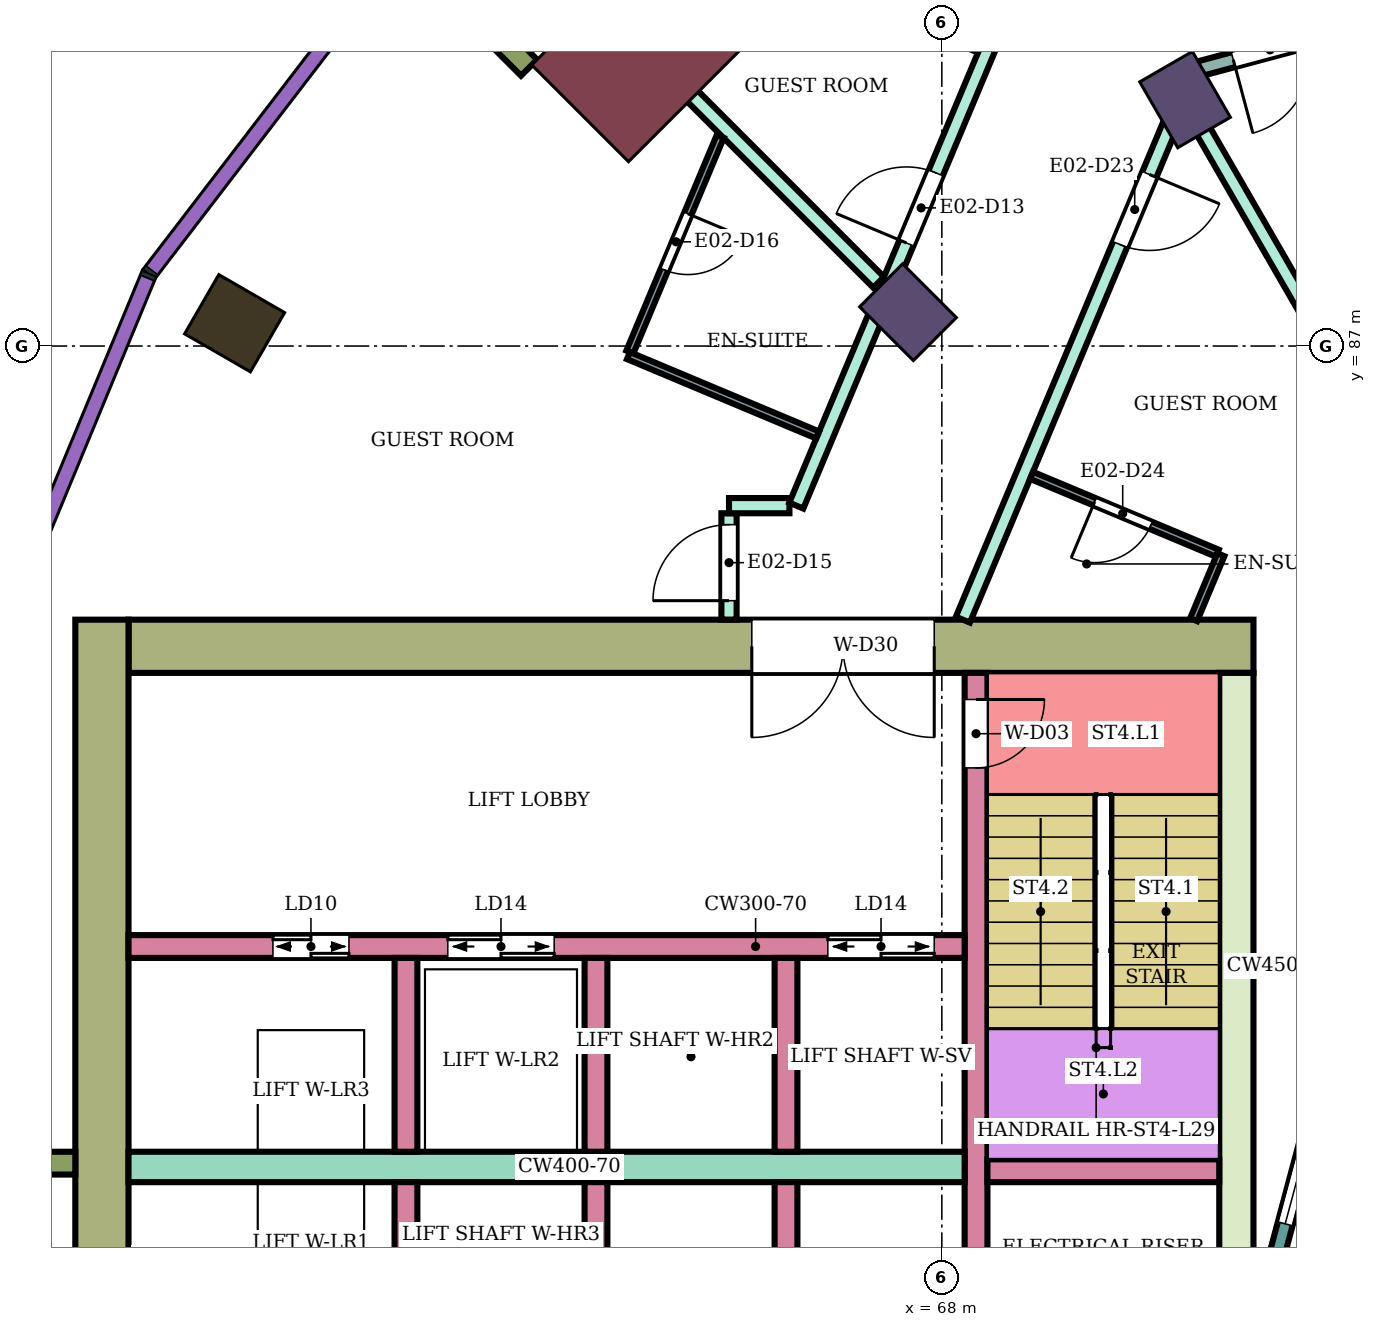
"""IFC4 building model, lengths in metres.
Left out: names, types, materials, properties, quantities, classifications, styles, units other than length and angle.
Written with IfcOpenShell. Run it as: python <this file> out.ifc"""

import sys

from ifc_helpers import new_model, si_unit, direction, frame, frame_2d, origin, origin_2d, place, context, subcontext, project, spatial, rectangle, extrude, element, fill, save


model = new_model("IFC4")
c1 = context("Model", 3, precision=1e-05, world=origin(), true_north=direction((0.0, 1.0)))
c2 = subcontext(c1, "Body", "Model", "MODEL_VIEW")
j1 = project(units=[si_unit("LENGTHUNIT", "METRE"), si_unit("PLANEANGLEUNIT", "RADIAN")], contexts=[c1])
p1 = place(None, origin())
s1 = spatial("IfcSite", under=j1, at=p1, CompositionType="ELEMENT")
p2 = place(p1, origin())
s2 = spatial("IfcBuilding", under=s1, at=p2, CompositionType="ELEMENT")
p3 = place(p2, frame((0.0, 0.0, 126.3)))
s3 = spatial("IfcBuildingStorey", under=s2, at=p3, CompositionType="ELEMENT", Elevation=126.3)
p4 = place(p3, frame((58.696, 87.3, 0.0), z_axis=(0.0, 0.0, 1.0), x_axis=(-0.866025403784, 0.5, 0.0)))
e1 = element("IfcColumn", 1, at=p4, inside=s3, PredefinedType="COLUMN", context=c2, shape_type="SweptSolid", body=[
    extrude(rectangle(XDim=1.0, YDim=0.9, at=origin_2d()), origin(), (0.0, 0.0, 1.0), 3.9),
])
for number, where, z_axis, x_axis in (
    (2, (71.2, 90.242, 0.0), (0.0, 0.0, 1.0), (-0.5, 0.866, 0.0)),
    (3, (67.555, 87.445, 0.0), (0.0, 0.0, 1.0), (-0.707, 0.707, 0.0)),
):
    element("IfcColumn", number, at=place(p3, frame(where, z_axis=z_axis, x_axis=x_axis)), inside=s3, PredefinedType="COLUMN", context=c2, shape_type="SweptSolid", body=[
        extrude(rectangle(XDim=1.0, YDim=0.8, at=origin_2d()), origin(), (0.0, 0.0, 1.0), 3.9),
    ])
p5 = place(p3, frame((64.09, 90.91, 0.0), z_axis=(0.0, 0.0, 1.0), x_axis=(-0.707106781187, 0.707106781187, 0.0)))
e4 = element("IfcColumn", 4, at=p5, inside=s3, PredefinedType="COLUMN", context=c2, shape_type="SweptSolid", body=[
    extrude(rectangle(XDim=1.8, YDim=2.4, at=origin_2d()), origin(), (0.0, 0.0, 1.0), 3.9),
])
p6 = place(p3, frame((72.1, 83.05, 0.0), z_axis=(0.0, 0.0, 1.0), x_axis=(-1.0, 0.0, 0.0)))
e5 = element("IfcWall", 5, at=p6, inside=s3, PredefinedType="SHEAR", context=c2, shape_type="SweptSolid", body=[
    extrude(rectangle(XDim=14.8, YDim=0.7, at=frame_2d((7.4, 0.0))), origin(), (0.0, 0.0, 1.0), 3.58),
])
p7 = place(p6, frame((4.2, 0.0, 0.0)))
e6 = element("IfcOpeningElement", 6, at=p7, cuts=e5, PredefinedType="OPENING", context=c2, shape_type="SweptSolid", body=[
    extrude(rectangle(XDim=2.4, YDim=2.4, at=frame_2d((1.2, 1.2))), frame((0.0, 0.36, 0.0), z_axis=(0.0, -1.0, 0.0), x_axis=(1.0, 0.0, 0.0)), (0.0, 0.0, 1.0), 0.72),
])
p8 = place(p3, frame((71.875, 82.7, 0.0), z_axis=(0.0, 0.0, 1.0), x_axis=(0.0, -1.0, 0.0)))
e7 = element("IfcWall", 7, at=p8, inside=s3, PredefinedType="SHEAR", context=c2, shape_type="SweptSolid", body=[
    extrude(rectangle(XDim=7.7, YDim=0.45, at=frame_2d((3.85, 0.0))), origin(), (0.0, 0.0, 1.0), 3.58),
])
p9 = place(p3, frame((56.95, 83.4, 0.0), z_axis=(0.0, 0.0, 1.0), x_axis=(0.0, -1.0, 0.0)))
e8 = element("IfcWall", 8, at=p9, inside=s3, PredefinedType="SHEAR", context=c2, shape_type="SweptSolid", body=[
    extrude(rectangle(XDim=16.8, YDim=0.7, at=frame_2d((8.4, 0.0))), origin(), (0.0, 0.0, 1.0), 3.58),
])
p10 = place(p3, frame((68.45, 82.7, 0.0), z_axis=(0.0, 0.0, 1.0), x_axis=(0.0, -1.0, 0.0)))
e9 = element("IfcWall", 9, at=p10, inside=s3, PredefinedType="SHEAR", context=c2, shape_type="SweptSolid", body=[
    extrude(rectangle(XDim=7.7, YDim=0.3, at=frame_2d((3.85, 0.0))), origin(), (0.0, 0.0, 1.0), 3.58),
])
p11 = place(p10, frame((0.35, 0.0, 0.0)))
e10 = element("IfcOpeningElement", 10, at=p11, cuts=e9, PredefinedType="OPENING", context=c2, shape_type="SweptSolid", body=[
    extrude(rectangle(XDim=0.9, YDim=2.1, at=frame_2d((0.45, 1.05))), frame((0.0, 0.16, 0.0), z_axis=(0.0, -1.0, 0.0), x_axis=(1.0, 0.0, 0.0)), (0.0, 0.0, 1.0), 0.32),
])
p12 = place(p3, frame((71.65, 76.15, 0.0), z_axis=(0.0, 0.0, 1.0), x_axis=(-1.0, 0.0, 0.0)))
e11 = element("IfcWall", 11, at=p12, inside=s3, PredefinedType="SHEAR", context=c2, shape_type="SweptSolid", body=[
    extrude(rectangle(XDim=3.05, YDim=0.3, at=frame_2d((1.525, 0.0))), origin(), (0.0, 0.0, 1.0), 3.58),
])
p13 = place(p3, frame((68.3, 76.2, 0.0), z_axis=(0.0, 0.0, 1.0), x_axis=(-1.0, 0.0, 0.0)))
e12 = element("IfcWall", 12, at=p13, inside=s3, PredefinedType="SHEAR", context=c2, shape_type="SweptSolid", body=[
    extrude(rectangle(XDim=11.0, YDim=0.4, at=frame_2d((5.5, 0.0))), origin(), (0.0, 0.0, 1.0), 3.58),
])
p14 = place(p3, frame((68.3, 79.1, 0.0), z_axis=(0.0, 0.0, 1.0), x_axis=(-1.0, 0.0, 0.0)))
e13 = element("IfcWall", 13, at=p14, inside=s3, PredefinedType="SHEAR", context=c2, shape_type="SweptSolid", body=[
    extrude(rectangle(XDim=11.0, YDim=0.3, at=frame_2d((5.5, 0.0))), origin(), (0.0, 0.0, 1.0), 3.58),
])
p15 = place(p14, frame((0.4, 0.0, 0.0)))
e14 = element("IfcOpeningElement", 14, at=p15, cuts=e13, PredefinedType="OPENING", context=c2, shape_type="SweptSolid", body=[
    extrude(rectangle(XDim=1.4, YDim=2.1, at=frame_2d((0.7, 1.05))), frame((0.0, 0.16, 0.0), z_axis=(0.0, -1.0, 0.0), x_axis=(1.0, 0.0, 0.0)), (0.0, 0.0, 1.0), 0.32),
])
p16 = place(p14, frame((5.4, 0.0, 0.0)))
e15 = element("IfcOpeningElement", 15, at=p16, cuts=e13, PredefinedType="OPENING", context=c2, shape_type="SweptSolid", body=[
    extrude(rectangle(XDim=1.4, YDim=2.1, at=frame_2d((0.7, 1.05))), frame((0.0, 0.16, 0.0), z_axis=(0.0, -1.0, 0.0), x_axis=(1.0, 0.0, 0.0)), (0.0, 0.0, 1.0), 0.32),
])
p17 = place(p14, frame((8.1, 0.0, 0.0)))
e16 = element("IfcOpeningElement", 16, at=p17, cuts=e13, PredefinedType="OPENING", context=c2, shape_type="SweptSolid", body=[
    extrude(rectangle(XDim=1.0, YDim=2.1, at=frame_2d((0.5, 1.05))), frame((0.0, 0.16, 0.0), z_axis=(0.0, -1.0, 0.0), x_axis=(1.0, 0.0, 0.0)), (0.0, 0.0, 1.0), 0.32),
])
for number, where, z_axis, x_axis in (
    (17, (65.95, 76.0, 0.0), (0.0, 0.0, 1.0), (0.0, -1.0, 0.0)),
    (18, (63.45, 76.0, 0.0), (0.0, 0.0, 1.0), (0.0, -1.0, 0.0)),
    (19, (60.95, 76.0, 0.0), (0.0, 0.0, 1.0), (0.0, -1.0, 0.0)),
    (20, (65.95, 78.95, 0.0), (0.0, 0.0, 1.0), (0.0, -1.0, 0.0)),
    (21, (63.45, 78.95, 0.0), (0.0, 0.0, 1.0), (0.0, -1.0, 0.0)),
    (22, (60.95, 78.95, 0.0), (0.0, 0.0, 1.0), (0.0, -1.0, 0.0)),
):
    element("IfcWall", number, at=place(p3, frame(where, z_axis=z_axis, x_axis=x_axis)), inside=s3, PredefinedType="SHEAR", context=c2, shape_type="SweptSolid", body=[
        extrude(rectangle(XDim=2.55, YDim=0.3, at=frame_2d((1.275, 0.0))), origin(), (0.0, 0.0, 1.0), 3.58),
    ])
for number, where, z_axis, x_axis in (
    (23, (62.57, 90.662, 0.0), (0.0, 0.0, 1.0), (-0.707, 0.707, 0.0)),
    (24, (56.6, 76.25, 0.0), (0.0, 0.0, 1.0), (-1.0, 0.0, 0.0)),
):
    element("IfcWall", number, at=place(p3, frame(where, z_axis=z_axis, x_axis=x_axis)), inside=s3, PredefinedType="NOTDEFINED", context=c2, shape_type="SweptSolid", body=[
        extrude(rectangle(XDim=2.416, YDim=0.3, at=frame_2d((1.208, 0.0))), origin(), (0.0, 0.0, 1.0), 3.9),
    ])
p18 = place(p3, frame((73.415, 78.802, 0.0), z_axis=(0.0, 0.0, 1.0), x_axis=(-0.258789828301, -0.965933654434, 0.0)))
e25 = element("IfcWall", 25, at=p18, inside=s3, PredefinedType="NOTDEFINED", context=c2, shape_type="SweptSolid", body=[
    extrude(rectangle(XDim=3.936, YDim=0.2, at=frame_2d((1.968, 0.0))), origin(), (0.0, 0.0, 1.0), 3.9),
])
p19 = place(p18, frame((0.468, 0.0, 0.9)))
e26 = element("IfcOpeningElement", 26, at=p19, cuts=e25, PredefinedType="OPENING", context=c2, shape_type="SweptSolid", body=[
    extrude(rectangle(XDim=3.0, YDim=2.3, at=frame_2d((1.5, 1.15))), frame((0.0, 0.11, 0.0), z_axis=(0.0, -1.0, 0.0), x_axis=(1.0, 0.0, 0.0)), (0.0, 0.0, 1.0), 0.22),
])
p20 = place(p3, frame((63.6, 91.409, 0.0), z_axis=(0.0, 0.0, 1.0), x_axis=(0.706937509868, -0.707276011993, 0.0)))
e27 = element("IfcWall", 27, at=p20, inside=s3, PredefinedType="PARTITIONING", context=c2, shape_type="SweptSolid", body=[
    extrude(rectangle(XDim=5.049, YDim=0.2, at=frame_2d((2.524, 0.0))), origin(), (0.0, 0.0, 1.0), 3.45),
])
p21 = place(p3, frame((65.2, 83.401, 0.0), z_axis=(0.0, 0.0, 1.0), x_axis=(0.0, 1.0, 0.0)))
e28 = element("IfcWall", 28, at=p21, inside=s3, PredefinedType="PARTITIONING", context=c2, shape_type="SweptSolid", body=[
    extrude(rectangle(XDim=1.399, YDim=0.2, at=frame_2d((0.7, 0.0))), origin(), (0.0, 0.0, 1.0), 3.45),
])
p22 = place(p21, frame((0.249, 0.0, 0.0)))
e29 = element("IfcOpeningElement", 29, at=p22, cuts=e28, PredefinedType="OPENING", context=c2, shape_type="SweptSolid", body=[
    extrude(rectangle(XDim=1.0, YDim=2.1, at=frame_2d((0.5, 1.05))), frame((0.0, 0.11, 0.0), z_axis=(0.0, -1.0, 0.0), x_axis=(1.0, 0.0, 0.0)), (0.0, 0.0, 1.0), 0.22),
])
p23 = place(p3, frame((65.2, 84.9, 0.0), z_axis=(0.0, 0.0, 1.0), x_axis=(1.0, 0.0, 0.0)))
e30 = element("IfcWall", 30, at=p23, inside=s3, PredefinedType="PARTITIONING", context=c2, shape_type="SweptSolid", body=[
    extrude(rectangle(XDim=0.795, YDim=0.2, at=frame_2d((0.397, 0.0))), origin(), (0.0, 0.0, 1.0), 3.45),
])
p24 = place(p3, frame((66.085, 84.9, 0.0), z_axis=(0.0, 0.0, 1.0), x_axis=(0.386617151403, 0.922240303956, 0.0)))
e31 = element("IfcWall", 31, at=p24, inside=s3, PredefinedType="PARTITIONING", context=c2, shape_type="SweptSolid", body=[
    extrude(rectangle(XDim=8.5, YDim=0.2, at=frame_2d((4.25, 0.0))), origin(), (0.0, 0.0, 1.0), 3.45),
])
p25 = place(p24, frame((3.748, 0.0, 0.0)))
e32 = element("IfcOpeningElement", 32, at=p25, cuts=e31, PredefinedType="OPENING", context=c2, shape_type="SweptSolid", body=[
    extrude(rectangle(XDim=1.0, YDim=2.1, at=frame_2d((0.5, 1.05))), frame((0.0, 0.11, 0.0), z_axis=(0.0, -1.0, 0.0), x_axis=(1.0, 0.0, 0.0)), (0.0, 0.0, 1.0), 0.22),
])
p26 = place(p3, frame((68.277, 83.4, 0.0), z_axis=(0.0, 0.0, 1.0), x_axis=(0.386454861164, 0.922308321703, 0.0)))
e33 = element("IfcWall", 33, at=p26, inside=s3, PredefinedType="PARTITIONING", context=c2, shape_type="SweptSolid", body=[
    extrude(rectangle(XDim=7.762, YDim=0.2, at=frame_2d((3.881, 0.0))), origin(), (0.0, 0.0, 1.0), 3.45),
])
p27 = place(p26, frame((5.351, 0.0, 0.0)))
e34 = element("IfcOpeningElement", 34, at=p27, cuts=e33, PredefinedType="OPENING", context=c2, shape_type="SweptSolid", body=[
    extrude(rectangle(XDim=1.0, YDim=2.1, at=frame_2d((0.5, 1.05))), frame((0.0, 0.11, 0.0), z_axis=(0.0, -1.0, 0.0), x_axis=(1.0, 0.0, 0.0)), (0.0, 0.0, 1.0), 0.22),
])
p28 = place(p3, frame((71.263, 90.135, 0.0), z_axis=(0.0, 0.0, 1.0), x_axis=(0.499869438034, -0.86610077065, 0.0)))
e35 = element("IfcWall", 35, at=p28, inside=s3, PredefinedType="PARTITIONING", context=c2, shape_type="SweptSolid", body=[
    extrude(rectangle(XDim=9.777, YDim=0.2, at=frame_2d((4.889, 0.0))), origin(), (0.0, 0.0, 1.0), 3.45),
])
p29 = place(p3, frame((71.303, 90.625, 0.0), z_axis=(0.0, 0.0, 1.0), x_axis=(0.965971868307, 0.258647152776, 0.0)))
e36 = element("IfcWall", 36, at=p29, inside=s3, PredefinedType="PARTITIONING", context=c2, shape_type="SweptSolid", body=[
    extrude(rectangle(XDim=8.874, YDim=0.2, at=frame_2d((4.437, 0.0))), origin(), (0.0, 0.0, 1.0), 3.08),
])
p30 = place(p29, frame((0.55, 0.0, 0.0)))
e37 = element("IfcOpeningElement", 37, at=p30, cuts=e36, PredefinedType="OPENING", context=c2, shape_type="SweptSolid", body=[
    extrude(rectangle(XDim=1.0, YDim=2.1, at=frame_2d((0.5, 1.05))), frame((0.0, 0.11, 0.0), z_axis=(0.0, -1.0, 0.0), x_axis=(1.0, 0.0, 0.0)), (0.0, 0.0, 1.0), 0.22),
])
p31 = place(p3, frame((63.896, 86.92, 0.0), z_axis=(0.0, 0.0, 1.0), x_axis=(0.386637413037, 0.922231809709, 0.0)))
e38 = element("IfcWall", 38, at=p31, inside=s3, PredefinedType="PARTITIONING", context=c2, shape_type="SweptSolid", body=[
    extrude(rectangle(XDim=3.076, YDim=0.1, at=frame_2d((1.538, 0.0))), origin(), (0.0, 0.0, 1.0), 3.45),
])
p32 = place(p31, frame((1.173, 0.0, 0.0)))
e39 = element("IfcOpeningElement", 39, at=p32, cuts=e38, PredefinedType="OPENING", context=c2, shape_type="SweptSolid", body=[
    extrude(rectangle(XDim=0.8, YDim=2.1, at=frame_2d((0.4, 1.05))), frame((0.0, 0.06, 0.0), z_axis=(0.0, -1.0, 0.0), x_axis=(1.0, 0.0, 0.0)), (0.0, 0.0, 1.0), 0.12),
])
p33 = place(p3, frame((63.877, 86.874, 0.0), z_axis=(0.0, 0.0, 1.0), x_axis=(0.92214860299, -0.386835823062, 0.0)))
e40 = element("IfcWall", 40, at=p33, inside=s3, PredefinedType="PARTITIONING", context=c2, shape_type="SweptSolid", body=[
    extrude(rectangle(XDim=2.7, YDim=0.1, at=frame_2d((1.35, 0.0))), origin(), (0.0, 0.0, 1.0), 3.45),
])
p34 = place(p3, frame((66.049, 91.931, 0.0), z_axis=(0.0, 0.0, 1.0), x_axis=(0.922344808264, -0.38636777126, 0.0)))
e41 = element("IfcWall", 41, at=p34, inside=s3, PredefinedType="PARTITIONING", context=c2, shape_type="SweptSolid", body=[
    extrude(rectangle(XDim=2.65, YDim=0.1, at=frame_2d((1.325, 0.0))), origin(), (0.0, 0.0, 1.0), 3.45),
])
p35 = place(p3, frame((69.181, 85.298, 0.0), z_axis=(0.0, 0.0, 1.0), x_axis=(0.922377635784, -0.38628939541, 0.0)))
e42 = element("IfcWall", 42, at=p35, inside=s3, PredefinedType="PARTITIONING", context=c2, shape_type="SweptSolid", body=[
    extrude(rectangle(XDim=2.65, YDim=0.1, at=frame_2d((1.325, 0.0))), origin(), (0.0, 0.0, 1.0), 3.45),
])
p36 = place(p35, frame((0.9, 0.0, 0.0)))
e43 = element("IfcOpeningElement", 43, at=p36, cuts=e42, PredefinedType="OPENING", context=c2, shape_type="SweptSolid", body=[
    extrude(rectangle(XDim=0.8, YDim=2.1, at=frame_2d((0.4, 1.05))), frame((0.0, 0.06, 0.0), z_axis=(0.0, -1.0, 0.0), x_axis=(1.0, 0.0, 0.0)), (0.0, 0.0, 1.0), 0.12),
])
p37 = place(p3, frame((71.313, 83.4, 0.0), z_axis=(0.0, 0.0, 1.0), x_axis=(0.386148512695, 0.922436624459, 0.0)))
e44 = element("IfcWall", 44, at=p37, inside=s3, PredefinedType="PARTITIONING", context=c2, shape_type="SweptSolid", body=[
    extrude(rectangle(XDim=0.927, YDim=0.1, at=frame_2d((0.463, 0.0))), origin(), (0.0, 0.0, 1.0), 3.45),
])
p38 = place(p19, origin())
e45 = element("IfcWindow", 45, at=p38, inside=s3, PartitioningType="SINGLE_PANEL", PredefinedType="WINDOW", context=c2, shape_type="SweptSolid", body=[
    extrude(rectangle(XDim=3.0, YDim=2.3, at=frame_2d((1.5, 1.15))), frame((0.0, 0.03, 0.0), z_axis=(0.0, -1.0, 0.0), x_axis=(1.0, 0.0, 0.0)), (0.0, 0.0, 1.0), 0.06),
])
fill(e26, e45)
p39 = place(p25, origin())
e46 = element("IfcDoor", 46, at=p39, inside=s3, OperationType="SINGLE_SWING_LEFT", PredefinedType="DOOR", context=c2, shape_type="SweptSolid", body=[
    extrude(rectangle(XDim=1.0, YDim=2.1, at=frame_2d((0.5, 1.05))), frame((0.0, 0.025, 0.0), z_axis=(0.0, -1.0, 0.0), x_axis=(1.0, 0.0, 0.0)), (0.0, 0.0, 1.0), 0.05),
])
fill(e32, e46)
p40 = place(p22, origin())
e47 = element("IfcDoor", 47, at=p40, inside=s3, OperationType="SINGLE_SWING_LEFT", PredefinedType="DOOR", context=c2, shape_type="SweptSolid", body=[
    extrude(rectangle(XDim=1.0, YDim=2.1, at=frame_2d((0.5, 1.05))), frame((0.0, 0.025, 0.0), z_axis=(0.0, -1.0, 0.0), x_axis=(1.0, 0.0, 0.0)), (0.0, 0.0, 1.0), 0.05),
])
fill(e29, e47)
p41 = place(p32, frame((0.8, 0.0, 0.0), z_axis=(0.0, 0.0, 1.0), x_axis=(-1.0, 0.0, 0.0)))
e48 = element("IfcDoor", 48, at=p41, inside=s3, OperationType="SINGLE_SWING_LEFT", PredefinedType="DOOR", context=c2, shape_type="SweptSolid", body=[
    extrude(rectangle(XDim=0.8, YDim=2.1, at=frame_2d((0.4, 1.05))), frame((0.0, 0.025, 0.0), z_axis=(0.0, -1.0, 0.0), x_axis=(1.0, 0.0, 0.0)), (0.0, 0.0, 1.0), 0.05),
])
fill(e39, e48)
p42 = place(p30, frame((1.0, 0.0, 0.0), z_axis=(0.0, 0.0, 1.0), x_axis=(-1.0, 0.0, 0.0)))
e49 = element("IfcDoor", 49, at=p42, inside=s3, OperationType="SINGLE_SWING_RIGHT", PredefinedType="DOOR", context=c2, shape_type="SweptSolid", body=[
    extrude(rectangle(XDim=1.0, YDim=2.1, at=frame_2d((0.5, 1.05))), frame((0.0, 0.025, 0.0), z_axis=(0.0, -1.0, 0.0), x_axis=(1.0, 0.0, 0.0)), (0.0, 0.0, 1.0), 0.05),
])
fill(e37, e49)
p43 = place(p27, frame((1.0, 0.0, 0.0), z_axis=(0.0, 0.0, 1.0), x_axis=(-1.0, 0.0, 0.0)))
e50 = element("IfcDoor", 50, at=p43, inside=s3, OperationType="SINGLE_SWING_LEFT", PredefinedType="DOOR", context=c2, shape_type="SweptSolid", body=[
    extrude(rectangle(XDim=1.0, YDim=2.1, at=frame_2d((0.5, 1.05))), frame((0.0, 0.025, 0.0), z_axis=(0.0, -1.0, 0.0), x_axis=(1.0, 0.0, 0.0)), (0.0, 0.0, 1.0), 0.05),
])
fill(e34, e50)
p44 = place(p36, frame((0.8, 0.0, 0.0), z_axis=(0.0, 0.0, 1.0), x_axis=(-1.0, 0.0, 0.0)))
e51 = element("IfcDoor", 51, at=p44, inside=s3, OperationType="SINGLE_SWING_RIGHT", PredefinedType="DOOR", context=c2, shape_type="SweptSolid", body=[
    extrude(rectangle(XDim=0.8, YDim=2.1, at=frame_2d((0.4, 1.05))), frame((0.0, 0.025, 0.0), z_axis=(0.0, -1.0, 0.0), x_axis=(1.0, 0.0, 0.0)), (0.0, 0.0, 1.0), 0.05),
])
fill(e43, e51)
p45 = place(p11, origin())
e52 = element("IfcDoor", 52, at=p45, inside=s3, OperationType="SINGLE_SWING_LEFT", PredefinedType="DOOR", context=c2, shape_type="SweptSolid", body=[
    extrude(rectangle(XDim=0.9, YDim=2.1, at=frame_2d((0.45, 1.05))), frame((0.0, 0.025, 0.0), z_axis=(0.0, -1.0, 0.0), x_axis=(1.0, 0.0, 0.0)), (0.0, 0.0, 1.0), 0.05),
])
fill(e10, e52)
p46 = place(p15, origin())
e53 = element("IfcDoor", 53, at=p46, inside=s3, OperationType="DOUBLE_DOOR_SLIDING", PredefinedType="DOOR", context=c2, shape_type="SweptSolid", body=[
    extrude(rectangle(XDim=1.4, YDim=2.1, at=frame_2d((0.7, 1.05))), frame((0.0, 0.025, 0.0), z_axis=(0.0, -1.0, 0.0), x_axis=(1.0, 0.0, 0.0)), (0.0, 0.0, 1.0), 0.05),
])
fill(e14, e53)
p47 = place(p16, origin())
e54 = element("IfcDoor", 54, at=p47, inside=s3, OperationType="DOUBLE_DOOR_SLIDING", PredefinedType="DOOR", context=c2, shape_type="SweptSolid", body=[
    extrude(rectangle(XDim=1.4, YDim=2.1, at=frame_2d((0.7, 1.05))), frame((0.0, 0.025, 0.0), z_axis=(0.0, -1.0, 0.0), x_axis=(1.0, 0.0, 0.0)), (0.0, 0.0, 1.0), 0.05),
])
fill(e15, e54)
p48 = place(p17, origin())
e55 = element("IfcDoor", 55, at=p48, inside=s3, OperationType="DOUBLE_DOOR_SLIDING", PredefinedType="DOOR", context=c2, shape_type="SweptSolid", body=[
    extrude(rectangle(XDim=1.0, YDim=2.1, at=frame_2d((0.5, 1.05))), frame((0.0, 0.025, 0.0), z_axis=(0.0, -1.0, 0.0), x_axis=(1.0, 0.0, 0.0)), (0.0, 0.0, 1.0), 0.05),
])
fill(e16, e55)
p49 = place(p7, origin())
e56 = element("IfcDoor", 56, at=p49, inside=s3, OperationType="DOUBLE_DOOR_SINGLE_SWING", PredefinedType="DOOR", context=c2, shape_type="SweptSolid", body=[
    extrude(rectangle(XDim=2.4, YDim=2.4, at=frame_2d((1.2, 1.2))), frame((0.0, 0.025, 0.0), z_axis=(0.0, -1.0, 0.0), x_axis=(1.0, 0.0, 0.0)), (0.0, 0.0, 1.0), 0.05),
])
fill(e6, e56)
save(model, sys.argv[1])
